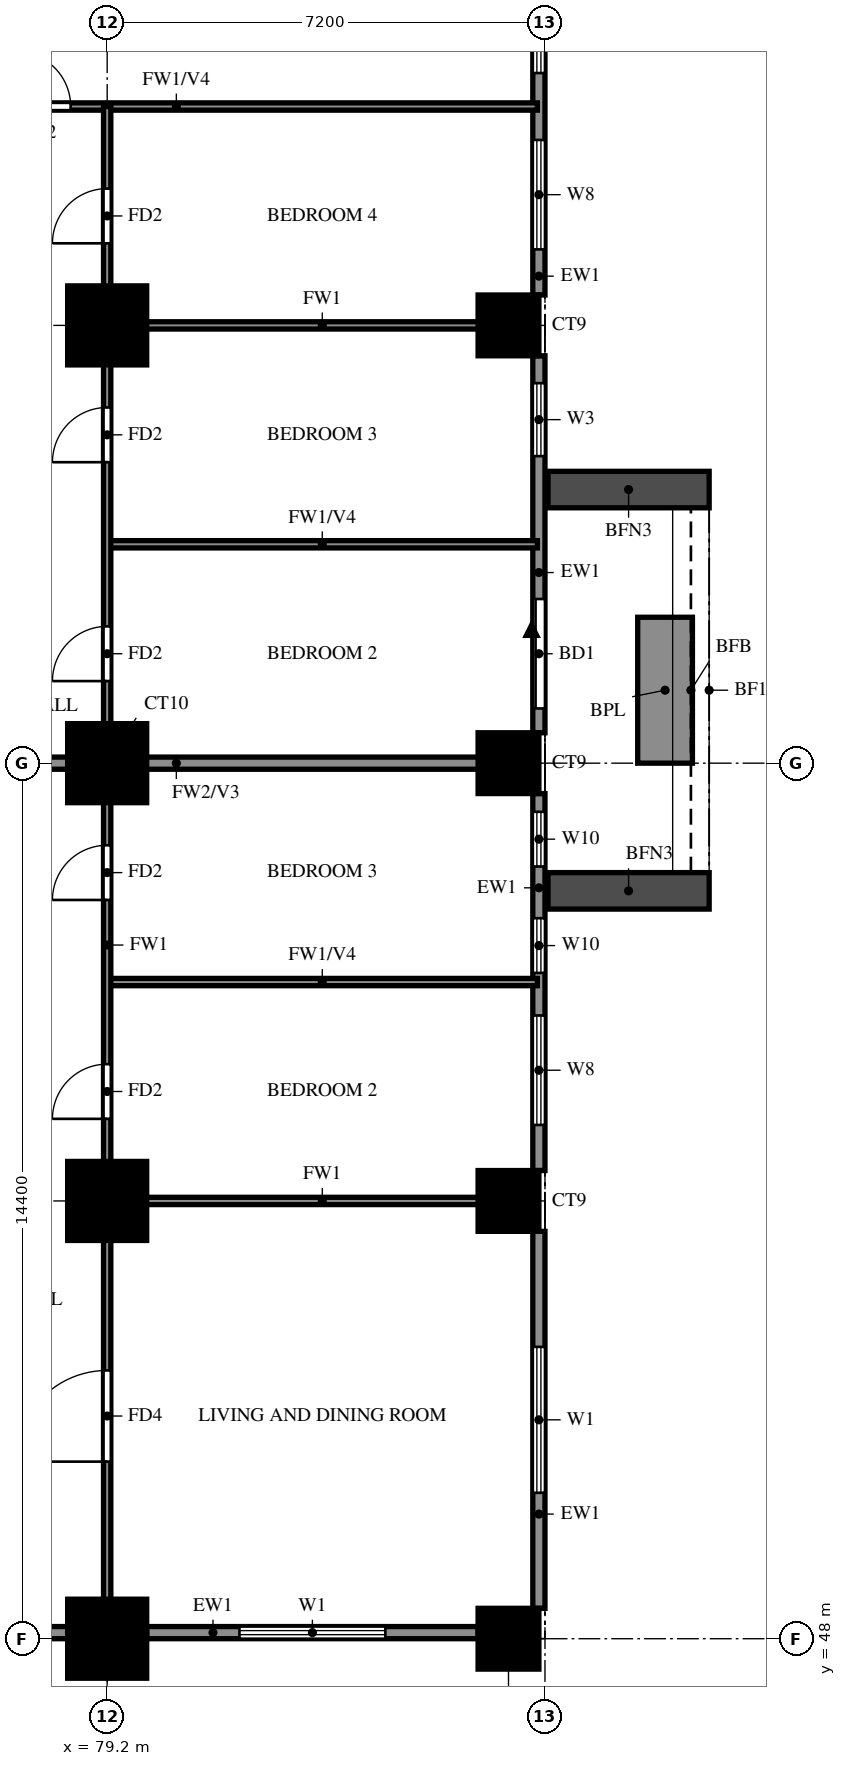
"""IFC4 building model, lengths in metres.
Left out: names, types, materials, properties, quantities, classifications, styles, units other than length and angle.
Written with IfcOpenShell. Run it as: python <this file> out.ifc"""

import sys

from ifc_helpers import new_model, si_unit, direction, frame, frame_2d, origin, origin_2d, place, context, subcontext, project, spatial, rectangle, extrude, source, transform, mapped, element, fill, save


model = new_model("IFC4")
c1 = context("Model", 3, precision=1e-05, world=origin(), true_north=direction((0.0, 1.0)))
c2 = subcontext(c1, "Body", "Model", "MODEL_VIEW")
j1 = project(units=[si_unit("LENGTHUNIT", "METRE"), si_unit("PLANEANGLEUNIT", "RADIAN")], contexts=[c1])
p1 = place(None, origin())
s1 = spatial("IfcSite", under=j1, at=p1, CompositionType="ELEMENT")
p2 = place(p1, origin())
s2 = spatial("IfcBuilding", under=s1, at=p2, CompositionType="ELEMENT")
p3 = place(p2, frame((0.0, 0.0, 79.5)))
s3 = spatial("IfcBuildingStorey", under=s2, at=p3, CompositionType="ELEMENT", Elevation=79.5)
m1 = source(origin(), c2, "Body", "SweptSolid", [
    extrude(rectangle(XDim=1.3, YDim=1.3, at=origin_2d()), origin(), (0.0, 0.0, 1.0), 3.18),
])
p4 = place(p3, frame((79.2, 48.0, 0.0), z_axis=(0.0, 0.0, 1.0), x_axis=(1.0, 0.0, 0.0)))
e1 = element("IfcColumn", 1, at=p4, inside=s3, PredefinedType="COLUMN", context=c2, shape_type="MappedRepresentation", body=[
    mapped(m1, transform((0.0, 0.0, 0.0))),
])
m2 = source(origin(), c2, "Body", "SweptSolid", [
    extrude(rectangle(XDim=1.0, YDim=1.0, at=origin_2d()), origin(), (0.0, 0.0, 1.0), 3.18),
])
p5 = place(p3, frame((85.8, 48.0, 0.0), z_axis=(0.0, 0.0, 1.0), x_axis=(1.0, 0.0, 0.0)))
e2 = element("IfcColumn", 2, at=p5, inside=s3, PredefinedType="COLUMN", context=c2, shape_type="MappedRepresentation", body=[
    mapped(m2, transform((0.0, 0.0, 0.0))),
])
p6 = place(p3, frame((79.2, 55.2, 0.0), z_axis=(0.0, 0.0, 1.0), x_axis=(1.0, 0.0, 0.0)))
e3 = element("IfcColumn", 3, at=p6, inside=s3, PredefinedType="COLUMN", context=c2, shape_type="MappedRepresentation", body=[
    mapped(m1, transform((0.0, 0.0, 0.0))),
])
p7 = place(p3, frame((85.8, 55.2, 0.0), z_axis=(0.0, 0.0, 1.0), x_axis=(1.0, 0.0, 0.0)))
e4 = element("IfcColumn", 4, at=p7, inside=s3, PredefinedType="COLUMN", context=c2, shape_type="MappedRepresentation", body=[
    mapped(m2, transform((0.0, 0.0, 0.0))),
])
p8 = place(p3, frame((79.2, 62.4, 0.0), z_axis=(0.0, 0.0, 1.0), x_axis=(1.0, 0.0, 0.0)))
e5 = element("IfcColumn", 5, at=p8, inside=s3, PredefinedType="COLUMN", context=c2, shape_type="MappedRepresentation", body=[
    mapped(m1, transform((0.0, 0.0, 0.0))),
])
p9 = place(p3, frame((85.8, 62.4, 0.0), z_axis=(0.0, 0.0, 1.0), x_axis=(1.0, 0.0, 0.0)))
e6 = element("IfcColumn", 6, at=p9, inside=s3, PredefinedType="COLUMN", context=c2, shape_type="MappedRepresentation", body=[
    mapped(m2, transform((0.0, 0.0, 0.0))),
])
p10 = place(p3, frame((79.2, 69.6, 0.0), z_axis=(0.0, 0.0, 1.0), x_axis=(1.0, 0.0, 0.0)))
e7 = element("IfcColumn", 7, at=p10, inside=s3, PredefinedType="COLUMN", context=c2, shape_type="MappedRepresentation", body=[
    mapped(m1, transform((0.0, 0.0, 0.0))),
])
p11 = place(p3, frame((85.8, 69.6, 0.0), z_axis=(0.0, 0.0, 1.0), x_axis=(1.0, 0.0, 0.0)))
e8 = element("IfcColumn", 8, at=p11, inside=s3, PredefinedType="COLUMN", context=c2, shape_type="MappedRepresentation", body=[
    mapped(m2, transform((0.0, 0.0, 0.0))),
])
p12 = place(p3, frame((85.996, 33.863, 0.0), z_axis=(0.0, 0.0, 1.0), x_axis=(-0.707100718496, 0.707112843825, 0.0)))
e9 = element("IfcWall", 9, at=p12, inside=s3, PredefinedType="SOLIDWALL", context=c2, shape_type="SweptSolid", body=[
    extrude(rectangle(XDim=20.135, YDim=0.2, at=frame_2d((10.067, 0.0))), origin(), (0.0, 0.0, 1.0), 3.18),
])
p13 = place(p3, frame((71.989, 48.1, 0.0), z_axis=(0.0, 0.0, 1.0), x_axis=(1.0, 0.0, 0.0)))
e10 = element("IfcWall", 10, at=p13, inside=s3, PredefinedType="SOLIDWALL", context=c2, shape_type="SweptSolid", body=[
    extrude(rectangle(XDim=6.562, YDim=0.2, at=frame_2d((3.281, 0.0))), origin(), (0.0, 0.0, 1.0), 3.18),
])
p14 = place(p13, frame((2.206, 0.0, 1.5)))
e11 = element("IfcOpeningElement", 11, at=p14, cuts=e10, PredefinedType="OPENING", context=c2, shape_type="SweptSolid", body=[
    extrude(rectangle(XDim=0.9, YDim=0.9, at=frame_2d((0.45, 0.45))), frame((0.0, 0.11, 0.0), z_axis=(0.0, -1.0, 0.0), x_axis=(1.0, 0.0, 0.0)), (0.0, 0.0, 1.0), 0.22),
])
p15 = place(p3, frame((79.85, 48.1, 0.0), z_axis=(0.0, 0.0, 1.0), x_axis=(1.0, 0.0, 0.0)))
e12 = element("IfcWall", 12, at=p15, inside=s3, PredefinedType="SOLIDWALL", context=c2, shape_type="SweptSolid", body=[
    extrude(rectangle(XDim=5.45, YDim=0.2, at=frame_2d((2.725, 0.0))), origin(), (0.0, 0.0, 1.0), 3.18),
])
p16 = place(p15, frame((1.525, 0.0, 0.6)))
e13 = element("IfcOpeningElement", 13, at=p16, cuts=e12, PredefinedType="OPENING", context=c2, shape_type="SweptSolid", body=[
    extrude(rectangle(XDim=2.4, YDim=2.4, at=frame_2d((1.2, 1.2))), frame((0.0, 0.11, 0.0), z_axis=(0.0, -1.0, 0.0), x_axis=(1.0, 0.0, 0.0)), (0.0, 0.0, 1.0), 0.22),
])
p17 = place(p3, frame((86.3, 48.5, 0.0), z_axis=(0.0, 0.0, 1.0), x_axis=(0.0, 1.0, 0.0)))
e14 = element("IfcWall", 14, at=p17, inside=s3, PredefinedType="SOLIDWALL", context=c2, shape_type="SweptSolid", body=[
    extrude(rectangle(XDim=6.2, YDim=0.2, at=frame_2d((3.1, 0.0))), origin(), (0.0, 0.0, 1.0), 3.18),
])
p18 = place(p17, frame((1.9, 0.0, 0.6)))
e15 = element("IfcOpeningElement", 15, at=p18, cuts=e14, PredefinedType="OPENING", context=c2, shape_type="SweptSolid", body=[
    extrude(rectangle(XDim=2.4, YDim=2.4, at=frame_2d((1.2, 1.2))), frame((0.0, 0.11, 0.0), z_axis=(0.0, -1.0, 0.0), x_axis=(1.0, 0.0, 0.0)), (0.0, 0.0, 1.0), 0.22),
])
p19 = place(p3, frame((86.3, 55.7, 0.0), z_axis=(0.0, 0.0, 1.0), x_axis=(0.0, 1.0, 0.0)))
e16 = element("IfcWall", 16, at=p19, inside=s3, PredefinedType="SOLIDWALL", context=c2, shape_type="SweptSolid", body=[
    extrude(rectangle(XDim=6.2, YDim=0.2, at=frame_2d((3.1, 0.0))), origin(), (0.0, 0.0, 1.0), 3.18),
])
p20 = place(p19, frame((0.75, 0.0, 0.6)))
e17 = element("IfcOpeningElement", 17, at=p20, cuts=e16, PredefinedType="OPENING", context=c2, shape_type="SweptSolid", body=[
    extrude(rectangle(XDim=1.8, YDim=2.4, at=frame_2d((0.9, 1.2))), frame((0.0, 0.11, 0.0), z_axis=(0.0, -1.0, 0.0), x_axis=(1.0, 0.0, 0.0)), (0.0, 0.0, 1.0), 0.22),
])
p21 = place(p19, frame((3.25, 0.0, 0.6)))
e18 = element("IfcOpeningElement", 18, at=p21, cuts=e16, PredefinedType="OPENING", context=c2, shape_type="SweptSolid", body=[
    extrude(rectangle(XDim=0.9, YDim=2.4, at=frame_2d((0.45, 1.2))), frame((0.0, 0.11, 0.0), z_axis=(0.0, -1.0, 0.0), x_axis=(1.0, 0.0, 0.0)), (0.0, 0.0, 1.0), 0.22),
])
p22 = place(p19, frame((5.0, 0.0, 0.6)))
e19 = element("IfcOpeningElement", 19, at=p22, cuts=e16, PredefinedType="OPENING", context=c2, shape_type="SweptSolid", body=[
    extrude(rectangle(XDim=0.9, YDim=2.4, at=frame_2d((0.45, 1.2))), frame((0.0, 0.11, 0.0), z_axis=(0.0, -1.0, 0.0), x_axis=(1.0, 0.0, 0.0)), (0.0, 0.0, 1.0), 0.22),
])
p23 = place(p3, frame((86.3, 62.9, 0.0), z_axis=(0.0, 0.0, 1.0), x_axis=(0.0, 1.0, 0.0)))
e20 = element("IfcWall", 20, at=p23, inside=s3, PredefinedType="SOLIDWALL", context=c2, shape_type="SweptSolid", body=[
    extrude(rectangle(XDim=6.2, YDim=0.2, at=frame_2d((3.1, 0.0))), origin(), (0.0, 0.0, 1.0), 3.18),
])
p24 = place(p23, frame((0.4, 0.0, 0.0)))
e21 = element("IfcOpeningElement", 21, at=p24, cuts=e20, PredefinedType="OPENING", context=c2, shape_type="SweptSolid", body=[
    extrude(rectangle(XDim=1.8, YDim=2.4, at=frame_2d((0.9, 1.2))), frame((0.0, 0.11, 0.0), z_axis=(0.0, -1.0, 0.0), x_axis=(1.0, 0.0, 0.0)), (0.0, 0.0, 1.0), 0.22),
])
p25 = place(p23, frame((4.55, 0.0, 0.6)))
e22 = element("IfcOpeningElement", 22, at=p25, cuts=e20, PredefinedType="OPENING", context=c2, shape_type="SweptSolid", body=[
    extrude(rectangle(XDim=1.2, YDim=2.4, at=frame_2d((0.6, 1.2))), frame((0.0, 0.11, 0.0), z_axis=(0.0, -1.0, 0.0), x_axis=(1.0, 0.0, 0.0)), (0.0, 0.0, 1.0), 0.22),
])
p26 = place(p3, frame((86.3, 70.1, 0.0), z_axis=(0.0, 0.0, 1.0), x_axis=(0.0, 1.0, 0.0)))
e23 = element("IfcWall", 23, at=p26, inside=s3, PredefinedType="SOLIDWALL", context=c2, shape_type="SweptSolid", body=[
    extrude(rectangle(XDim=6.2, YDim=0.2, at=frame_2d((3.1, 0.0))), origin(), (0.0, 0.0, 1.0), 3.18),
])
p27 = place(p26, frame((0.75, 0.0, 0.6)))
e24 = element("IfcOpeningElement", 24, at=p27, cuts=e23, PredefinedType="OPENING", context=c2, shape_type="SweptSolid", body=[
    extrude(rectangle(XDim=1.8, YDim=2.4, at=frame_2d((0.9, 1.2))), frame((0.0, 0.11, 0.0), z_axis=(0.0, -1.0, 0.0), x_axis=(1.0, 0.0, 0.0)), (0.0, 0.0, 1.0), 0.22),
])
p28 = place(p26, frame((3.65, 0.0, 0.6)))
e25 = element("IfcOpeningElement", 25, at=p28, cuts=e23, PredefinedType="OPENING", context=c2, shape_type="SweptSolid", body=[
    extrude(rectangle(XDim=1.8, YDim=2.4, at=frame_2d((0.9, 1.2))), frame((0.0, 0.11, 0.0), z_axis=(0.0, -1.0, 0.0), x_axis=(1.0, 0.0, 0.0)), (0.0, 0.0, 1.0), 0.22),
])
for number, where, z_axis, x_axis in (
    (26, (86.45, 60.3, 0.0), (0.0, 0.0, 1.0), (1.0, 0.0, 0.0)),
    (27, (86.45, 66.9, 0.0), (0.0, 0.0, 1.0), (1.0, 0.0, 0.0)),
):
    element("IfcWall", number, at=place(p3, frame(where, z_axis=z_axis, x_axis=x_axis)), inside=s3, PredefinedType="SOLIDWALL", context=c2, shape_type="SweptSolid", body=[
        extrude(rectangle(XDim=2.65, YDim=0.6, at=frame_2d((1.325, 0.0))), origin(), (0.0, 0.0, 1.0), 2.85),
    ])
p29 = place(p3, frame((88.375, 62.4, 0.0), z_axis=(0.0, 0.0, 1.0), x_axis=(0.0, 1.0, 0.0)))
e28 = element("IfcWall", 28, at=p29, inside=s3, PredefinedType="SOLIDWALL", context=c2, shape_type="SweptSolid", body=[
    extrude(rectangle(XDim=2.4, YDim=0.9, at=frame_2d((1.2, 0.0))), origin(), (0.0, 0.0, 1.0), 0.9),
])
p30 = place(p3, frame((74.4, 62.4, 0.0), z_axis=(0.0, 0.0, 1.0), x_axis=(1.0, 0.0, 0.0)))
e29 = element("IfcWall", 29, at=p30, inside=s3, PredefinedType="SOLIDWALL", context=c2, shape_type="SweptSolid", body=[
    extrude(rectangle(XDim=11.875, YDim=0.2, at=frame_2d((5.938, 0.0))), origin(), (0.0, 0.0, 1.0), 3.18),
])
p31 = place(p3, frame((79.2, 55.2, 0.0), z_axis=(0.0, 0.0, 1.0), x_axis=(1.0, 0.0, 0.0)))
e30 = element("IfcWall", 30, at=p31, inside=s3, PredefinedType="PARTITIONING", context=c2, shape_type="SweptSolid", body=[
    extrude(rectangle(XDim=7.075, YDim=0.12, at=frame_2d((3.538, 0.0))), origin(), (0.0, 0.0, 1.0), 3.18),
])
for number, where, z_axis, x_axis in (
    (31, (79.2, 58.8, 0.0), (0.0, 0.0, 1.0), (1.0, 0.0, 0.0)),
    (32, (79.2, 66.0, 0.0), (0.0, 0.0, 1.0), (1.0, 0.0, 0.0)),
):
    element("IfcWall", number, at=place(p3, frame(where, z_axis=z_axis, x_axis=x_axis)), inside=s3, PredefinedType="PARTITIONING", context=c2, shape_type="SweptSolid", body=[
        extrude(rectangle(XDim=7.075, YDim=0.12, at=frame_2d((3.538, 0.0))), origin(), (0.0, 0.0, 1.0), 2.28),
    ])
p32 = place(p3, frame((79.2, 69.6, 0.0), z_axis=(0.0, 0.0, 1.0), x_axis=(1.0, 0.0, 0.0)))
e33 = element("IfcWall", 33, at=p32, inside=s3, PredefinedType="PARTITIONING", context=c2, shape_type="SweptSolid", body=[
    extrude(rectangle(XDim=7.075, YDim=0.12, at=frame_2d((3.538, 0.0))), origin(), (0.0, 0.0, 1.0), 3.18),
])
p33 = place(p3, frame((74.4, 73.2, 0.0), z_axis=(0.0, 0.0, 1.0), x_axis=(1.0, 0.0, 0.0)))
e34 = element("IfcWall", 34, at=p33, inside=s3, PredefinedType="PARTITIONING", context=c2, shape_type="SweptSolid", body=[
    extrude(rectangle(XDim=11.875, YDim=0.12, at=frame_2d((5.938, 0.0))), origin(), (0.0, 0.0, 1.0), 2.28),
])
p34 = place(p33, frame((3.3, 0.0, 0.0)))
e35 = element("IfcOpeningElement", 35, at=p34, cuts=e34, PredefinedType="OPENING", context=c2, shape_type="SweptSolid", body=[
    extrude(rectangle(XDim=0.9, YDim=2.1, at=frame_2d((0.45, 1.05))), frame((0.0, 0.07, 0.0), z_axis=(0.0, -1.0, 0.0), x_axis=(1.0, 0.0, 0.0)), (0.0, 0.0, 1.0), 0.14),
])
p35 = place(p3, frame((79.2, 48.125, 0.0), z_axis=(0.0, 0.0, 1.0), x_axis=(0.0, 1.0, 0.0)))
e36 = element("IfcWall", 36, at=p35, inside=s3, PredefinedType="PARTITIONING", context=c2, shape_type="SweptSolid", body=[
    extrude(rectangle(XDim=25.075, YDim=0.12, at=frame_2d((12.538, 0.0))), origin(), (0.0, 0.0, 1.0), 3.18),
])
p36 = place(p35, frame((2.788, 0.0, 0.0)))
e37 = element("IfcOpeningElement", 37, at=p36, cuts=e36, PredefinedType="OPENING", context=c2, shape_type="SweptSolid", body=[
    extrude(rectangle(XDim=1.5, YDim=2.1, at=frame_2d((0.75, 1.05))), frame((0.0, 0.07, 0.0), z_axis=(0.0, -1.0, 0.0), x_axis=(1.0, 0.0, 0.0)), (0.0, 0.0, 1.0), 0.14),
])
p37 = place(p35, frame((8.425, 0.0, 0.0)))
e38 = element("IfcOpeningElement", 38, at=p37, cuts=e36, PredefinedType="OPENING", context=c2, shape_type="SweptSolid", body=[
    extrude(rectangle(XDim=0.9, YDim=2.1, at=frame_2d((0.45, 1.05))), frame((0.0, 0.07, 0.0), z_axis=(0.0, -1.0, 0.0), x_axis=(1.0, 0.0, 0.0)), (0.0, 0.0, 1.0), 0.14),
])
p38 = place(p35, frame((12.025, 0.0, 0.0)))
e39 = element("IfcOpeningElement", 39, at=p38, cuts=e36, PredefinedType="OPENING", context=c2, shape_type="SweptSolid", body=[
    extrude(rectangle(XDim=0.9, YDim=2.1, at=frame_2d((0.45, 1.05))), frame((0.0, 0.07, 0.0), z_axis=(0.0, -1.0, 0.0), x_axis=(1.0, 0.0, 0.0)), (0.0, 0.0, 1.0), 0.14),
])
p39 = place(p35, frame((15.625, 0.0, 0.0)))
e40 = element("IfcOpeningElement", 40, at=p39, cuts=e36, PredefinedType="OPENING", context=c2, shape_type="SweptSolid", body=[
    extrude(rectangle(XDim=0.9, YDim=2.1, at=frame_2d((0.45, 1.05))), frame((0.0, 0.07, 0.0), z_axis=(0.0, -1.0, 0.0), x_axis=(1.0, 0.0, 0.0)), (0.0, 0.0, 1.0), 0.14),
])
p40 = place(p35, frame((19.225, 0.0, 0.0)))
e41 = element("IfcOpeningElement", 41, at=p40, cuts=e36, PredefinedType="OPENING", context=c2, shape_type="SweptSolid", body=[
    extrude(rectangle(XDim=0.9, YDim=2.1, at=frame_2d((0.45, 1.05))), frame((0.0, 0.07, 0.0), z_axis=(0.0, -1.0, 0.0), x_axis=(1.0, 0.0, 0.0)), (0.0, 0.0, 1.0), 0.14),
])
p41 = place(p35, frame((22.825, 0.0, 0.0)))
e42 = element("IfcOpeningElement", 42, at=p41, cuts=e36, PredefinedType="OPENING", context=c2, shape_type="SweptSolid", body=[
    extrude(rectangle(XDim=0.9, YDim=2.1, at=frame_2d((0.45, 1.05))), frame((0.0, 0.07, 0.0), z_axis=(0.0, -1.0, 0.0), x_axis=(1.0, 0.0, 0.0)), (0.0, 0.0, 1.0), 0.14),
])
p42 = place(p16, origin())
e43 = element("IfcWindow", 43, at=p42, inside=s3, PartitioningType="DOUBLE_PANEL_VERTICAL", PredefinedType="WINDOW", context=c2, shape_type="SweptSolid", body=[
    extrude(rectangle(XDim=2.4, YDim=2.4, at=frame_2d((1.2, 1.2))), frame((0.0, 0.03, 0.0), z_axis=(0.0, -1.0, 0.0), x_axis=(1.0, 0.0, 0.0)), (0.0, 0.0, 1.0), 0.06),
])
fill(e13, e43)
p43 = place(p18, origin())
e44 = element("IfcWindow", 44, at=p43, inside=s3, PartitioningType="DOUBLE_PANEL_VERTICAL", PredefinedType="WINDOW", context=c2, shape_type="SweptSolid", body=[
    extrude(rectangle(XDim=2.4, YDim=2.4, at=frame_2d((1.2, 1.2))), frame((0.0, 0.03, 0.0), z_axis=(0.0, -1.0, 0.0), x_axis=(1.0, 0.0, 0.0)), (0.0, 0.0, 1.0), 0.06),
])
fill(e15, e44)
p44 = place(p20, origin())
e45 = element("IfcWindow", 45, at=p44, inside=s3, PartitioningType="DOUBLE_PANEL_VERTICAL", PredefinedType="WINDOW", context=c2, shape_type="SweptSolid", body=[
    extrude(rectangle(XDim=1.8, YDim=2.4, at=frame_2d((0.9, 1.2))), frame((0.0, 0.03, 0.0), z_axis=(0.0, -1.0, 0.0), x_axis=(1.0, 0.0, 0.0)), (0.0, 0.0, 1.0), 0.06),
])
fill(e17, e45)
p45 = place(p21, origin())
e46 = element("IfcWindow", 46, at=p45, inside=s3, PartitioningType="SINGLE_PANEL", PredefinedType="WINDOW", context=c2, shape_type="SweptSolid", body=[
    extrude(rectangle(XDim=0.9, YDim=2.4, at=frame_2d((0.45, 1.2))), frame((0.0, 0.03, 0.0), z_axis=(0.0, -1.0, 0.0), x_axis=(1.0, 0.0, 0.0)), (0.0, 0.0, 1.0), 0.06),
])
fill(e18, e46)
p46 = place(p22, origin())
e47 = element("IfcWindow", 47, at=p46, inside=s3, PartitioningType="SINGLE_PANEL", PredefinedType="WINDOW", context=c2, shape_type="SweptSolid", body=[
    extrude(rectangle(XDim=0.9, YDim=2.4, at=frame_2d((0.45, 1.2))), frame((0.0, 0.03, 0.0), z_axis=(0.0, -1.0, 0.0), x_axis=(1.0, 0.0, 0.0)), (0.0, 0.0, 1.0), 0.06),
])
fill(e19, e47)
p47 = place(p24, origin())
e48 = element("IfcDoor", 48, at=p47, inside=s3, OperationType="DOUBLE_DOOR_SLIDING", PredefinedType="DOOR", context=c2, shape_type="SweptSolid", body=[
    extrude(rectangle(XDim=1.8, YDim=2.4, at=frame_2d((0.9, 1.2))), frame((0.0, 0.025, 0.0), z_axis=(0.0, -1.0, 0.0), x_axis=(1.0, 0.0, 0.0)), (0.0, 0.0, 1.0), 0.05),
])
fill(e21, e48)
p48 = place(p25, origin())
e49 = element("IfcWindow", 49, at=p48, inside=s3, PartitioningType="SINGLE_PANEL", PredefinedType="WINDOW", context=c2, shape_type="SweptSolid", body=[
    extrude(rectangle(XDim=1.2, YDim=2.4, at=frame_2d((0.6, 1.2))), frame((0.0, 0.03, 0.0), z_axis=(0.0, -1.0, 0.0), x_axis=(1.0, 0.0, 0.0)), (0.0, 0.0, 1.0), 0.06),
])
fill(e22, e49)
p49 = place(p27, origin())
e50 = element("IfcWindow", 50, at=p49, inside=s3, PartitioningType="DOUBLE_PANEL_VERTICAL", PredefinedType="WINDOW", context=c2, shape_type="SweptSolid", body=[
    extrude(rectangle(XDim=1.8, YDim=2.4, at=frame_2d((0.9, 1.2))), frame((0.0, 0.03, 0.0), z_axis=(0.0, -1.0, 0.0), x_axis=(1.0, 0.0, 0.0)), (0.0, 0.0, 1.0), 0.06),
])
fill(e24, e50)
p50 = place(p28, origin())
e51 = element("IfcWindow", 51, at=p50, inside=s3, PartitioningType="DOUBLE_PANEL_VERTICAL", PredefinedType="WINDOW", context=c2, shape_type="SweptSolid", body=[
    extrude(rectangle(XDim=1.8, YDim=2.4, at=frame_2d((0.9, 1.2))), frame((0.0, 0.03, 0.0), z_axis=(0.0, -1.0, 0.0), x_axis=(1.0, 0.0, 0.0)), (0.0, 0.0, 1.0), 0.06),
])
fill(e25, e51)
p51 = place(p36, origin())
e52 = element("IfcDoor", 52, at=p51, inside=s3, OperationType="SINGLE_SWING_LEFT", PredefinedType="DOOR", context=c2, shape_type="SweptSolid", body=[
    extrude(rectangle(XDim=1.5, YDim=2.1, at=frame_2d((0.75, 1.05))), frame((0.0, 0.025, 0.0), z_axis=(0.0, -1.0, 0.0), x_axis=(1.0, 0.0, 0.0)), (0.0, 0.0, 1.0), 0.05),
])
fill(e37, e52)
p52 = place(p37, origin())
e53 = element("IfcDoor", 53, at=p52, inside=s3, OperationType="SINGLE_SWING_RIGHT", PredefinedType="DOOR", context=c2, shape_type="SweptSolid", body=[
    extrude(rectangle(XDim=0.9, YDim=2.1, at=frame_2d((0.45, 1.05))), frame((0.0, 0.025, 0.0), z_axis=(0.0, -1.0, 0.0), x_axis=(1.0, 0.0, 0.0)), (0.0, 0.0, 1.0), 0.05),
])
fill(e38, e53)
p53 = place(p38, origin())
e54 = element("IfcDoor", 54, at=p53, inside=s3, OperationType="SINGLE_SWING_LEFT", PredefinedType="DOOR", context=c2, shape_type="SweptSolid", body=[
    extrude(rectangle(XDim=0.9, YDim=2.1, at=frame_2d((0.45, 1.05))), frame((0.0, 0.025, 0.0), z_axis=(0.0, -1.0, 0.0), x_axis=(1.0, 0.0, 0.0)), (0.0, 0.0, 1.0), 0.05),
])
fill(e39, e54)
p54 = place(p39, origin())
e55 = element("IfcDoor", 55, at=p54, inside=s3, OperationType="SINGLE_SWING_LEFT", PredefinedType="DOOR", context=c2, shape_type="SweptSolid", body=[
    extrude(rectangle(XDim=0.9, YDim=2.1, at=frame_2d((0.45, 1.05))), frame((0.0, 0.025, 0.0), z_axis=(0.0, -1.0, 0.0), x_axis=(1.0, 0.0, 0.0)), (0.0, 0.0, 1.0), 0.05),
])
fill(e40, e55)
p55 = place(p40, origin())
e56 = element("IfcDoor", 56, at=p55, inside=s3, OperationType="SINGLE_SWING_RIGHT", PredefinedType="DOOR", context=c2, shape_type="SweptSolid", body=[
    extrude(rectangle(XDim=0.9, YDim=2.1, at=frame_2d((0.45, 1.05))), frame((0.0, 0.025, 0.0), z_axis=(0.0, -1.0, 0.0), x_axis=(1.0, 0.0, 0.0)), (0.0, 0.0, 1.0), 0.05),
])
fill(e41, e56)
p56 = place(p41, origin())
e57 = element("IfcDoor", 57, at=p56, inside=s3, OperationType="SINGLE_SWING_LEFT", PredefinedType="DOOR", context=c2, shape_type="SweptSolid", body=[
    extrude(rectangle(XDim=0.9, YDim=2.1, at=frame_2d((0.45, 1.05))), frame((0.0, 0.025, 0.0), z_axis=(0.0, -1.0, 0.0), x_axis=(1.0, 0.0, 0.0)), (0.0, 0.0, 1.0), 0.05),
])
fill(e42, e57)
p57 = place(p34, origin())
e58 = element("IfcDoor", 58, at=p57, inside=s3, OperationType="SINGLE_SWING_LEFT", PredefinedType="DOOR", context=c2, shape_type="SweptSolid", body=[
    extrude(rectangle(XDim=0.9, YDim=2.1, at=frame_2d((0.45, 1.05))), frame((0.0, 0.025, 0.0), z_axis=(0.0, -1.0, 0.0), x_axis=(1.0, 0.0, 0.0)), (0.0, 0.0, 1.0), 0.05),
])
fill(e35, e58)
save(model, sys.argv[1])
